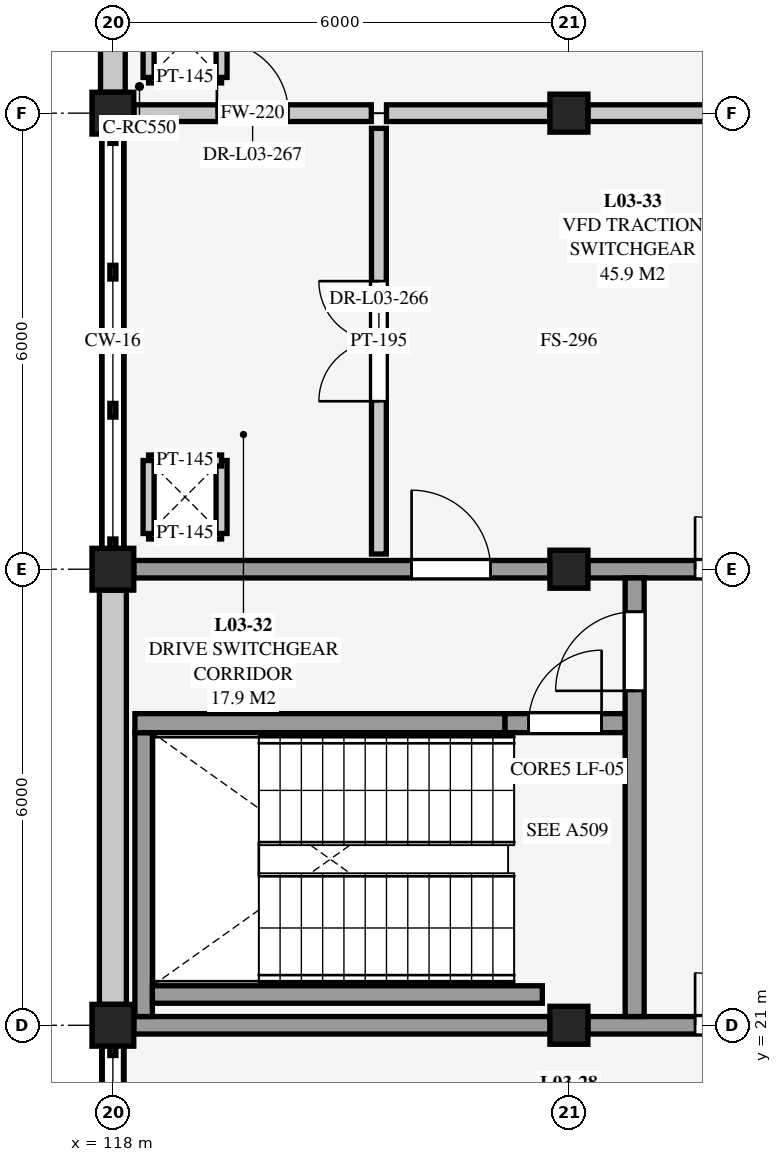
"""IFC4 building model, lengths in metres.
Left out: names, types, materials, properties, quantities, classifications, styles, units other than length and angle.
Written with IfcOpenShell. Run it as: python <this file> out.ifc"""

import sys

from ifc_helpers import new_model, si_unit, direction, frame, frame_2d, origin, origin_2d, place, context, subcontext, project, spatial, rectangle, extrude, element, fill, save


model = new_model("IFC4")
c1 = context("Model", 3, precision=1e-05, world=origin(), true_north=direction((0.0, 1.0)))
c2 = subcontext(c1, "Body", "Model", "MODEL_VIEW")
j1 = project(units=[si_unit("LENGTHUNIT", "METRE"), si_unit("PLANEANGLEUNIT", "RADIAN")], contexts=[c1])
p1 = place(None, origin())
s1 = spatial("IfcSite", under=j1, at=p1, CompositionType="ELEMENT")
p2 = place(p1, origin())
s2 = spatial("IfcBuilding", under=s1, at=p2, CompositionType="ELEMENT")
p3 = place(p2, frame((0.0, 0.0, 9.0)))
s3 = spatial("IfcBuildingStorey", under=s2, at=p3, CompositionType="ELEMENT", Elevation=9.0)
for number, where, z_axis, x_axis in (
    (1, (118.0, 21.0, 0.0), (0.0, 0.0, 1.0), (1.0, 0.0, 0.0)),
    (2, (118.0, 27.0, 0.0), (0.0, 0.0, 1.0), (1.0, 0.0, 0.0)),
    (3, (118.0, 33.0, 0.0), (0.0, 0.0, 1.0), (1.0, 0.0, 0.0)),
):
    element("IfcColumn", number, at=place(p3, frame(where, z_axis=z_axis, x_axis=x_axis)), inside=s3, PredefinedType="COLUMN", context=c2, shape_type="SweptSolid", body=[
        extrude(rectangle(XDim=0.55, YDim=0.55, at=origin_2d()), origin(), (0.0, 0.0, 1.0), 4.5),
    ])
for number, where, z_axis, x_axis in (
    (4, (124.0, 21.0, 0.0), (0.0, 0.0, 1.0), (1.0, 0.0, 0.0)),
    (5, (124.0, 27.0, 0.0), (0.0, 0.0, 1.0), (1.0, 0.0, 0.0)),
    (6, (124.0, 33.0, 0.0), (0.0, 0.0, 1.0), (1.0, 0.0, 0.0)),
):
    element("IfcColumn", number, at=place(p3, frame(where, z_axis=z_axis, x_axis=x_axis)), inside=s3, PredefinedType="COLUMN", context=c2, shape_type="SweptSolid", body=[
        extrude(rectangle(XDim=0.5, YDim=0.5, at=origin_2d()), origin(), (0.0, 0.0, 1.0), 4.5),
    ])
p4 = place(p3, frame((118.0, 15.25, 0.0), z_axis=(0.0, 0.0, 1.0), x_axis=(0.0, 1.0, 0.0)))
e7 = element("IfcWall", 7, at=p4, inside=s3, PredefinedType="SOLIDWALL", context=c2, shape_type="SweptSolid", body=[
    extrude(rectangle(XDim=5.475, YDim=0.295, at=frame_2d((2.738, 0.0))), origin(), (0.0, 0.0, 1.0), 0.46),
])
p5 = place(p3, frame((118.0, 21.275, 0.0), z_axis=(0.0, 0.0, 1.0), x_axis=(0.0, 1.0, 0.0)))
e8 = element("IfcWall", 8, at=p5, inside=s3, PredefinedType="SOLIDWALL", context=c2, shape_type="SweptSolid", body=[
    extrude(rectangle(XDim=5.45, YDim=0.355, at=frame_2d((2.725, 0.0))), origin(), (0.0, 0.0, 1.0), 3.778),
])
p6 = place(p3, frame((118.0, 27.275, 0.0), z_axis=(0.0, 0.0, 1.0), x_axis=(0.0, 1.0, 0.0)))
e9 = element("IfcWall", 9, at=p6, inside=s3, PredefinedType="SOLIDWALL", context=c2, shape_type="SweptSolid", body=[
    extrude(rectangle(XDim=5.45, YDim=0.295, at=frame_2d((2.725, 0.0))), origin(), (0.0, 0.0, 1.0), 0.52),
])
p7 = place(p3, frame((118.0, 33.275, 0.0), z_axis=(0.0, 0.0, 1.0), x_axis=(0.0, 1.0, 0.0)))
e10 = element("IfcWall", 10, at=p7, inside=s3, PredefinedType="SOLIDWALL", context=c2, shape_type="SweptSolid", body=[
    extrude(rectangle(XDim=5.45, YDim=0.325, at=frame_2d((2.725, 0.0))), origin(), (0.0, 0.0, 1.0), 3.778),
])
p8 = place(p7, frame((1.85, 0.0, 0.75)))
e11 = element("IfcOpeningElement", 11, at=p8, cuts=e10, PredefinedType="OPENING", context=c2, shape_type="SweptSolid", body=[
    extrude(rectangle(XDim=1.75, YDim=2.3, at=frame_2d((0.875, 1.15))), frame((0.0, 0.173, 0.0), z_axis=(0.0, -1.0, 0.0), x_axis=(1.0, 0.0, 0.0)), (0.0, 0.0, 1.0), 0.345),
])
for number, where, z_axis, x_axis in (
    (12, (118.47, 27.47, 0.0), (0.0, 0.0, 1.0), (1.0, 0.0, 0.0)),
    (13, (119.43, 27.47, 0.0), (0.0, 0.0, 1.0), (0.0, 1.0, 0.0)),
    (14, (119.43, 28.43, 0.0), (0.0, 0.0, 1.0), (-1.0, 0.0, 0.0)),
    (15, (118.47, 28.43, 0.0), (0.0, 0.0, 1.0), (0.0, -1.0, 0.0)),
):
    element("IfcWall", number, at=place(p3, frame(where, z_axis=z_axis, x_axis=x_axis)), inside=s3, PredefinedType="PARTITIONING", context=c2, shape_type="SweptSolid", body=[
        extrude(rectangle(XDim=0.96, YDim=0.145, at=frame_2d((0.48, 0.0))), origin(), (0.0, 0.0, 1.0), 4.185),
    ])
for number, where, z_axis, x_axis in (
    (16, (118.47, 33.47, 0.0), (0.0, 0.0, 1.0), (1.0, 0.0, 0.0)),
    (17, (119.43, 33.47, 0.0), (0.0, 0.0, 1.0), (0.0, 1.0, 0.0)),
    (18, (118.47, 34.43, 0.0), (0.0, 0.0, 1.0), (0.0, -1.0, 0.0)),
):
    element("IfcWall", number, at=place(p3, frame(where, z_axis=z_axis, x_axis=x_axis)), inside=s3, PredefinedType="PARTITIONING", context=c2, shape_type="SweptSolid", body=[
        extrude(rectangle(XDim=0.96, YDim=0.145, at=frame_2d((0.48, 0.0))), origin(), (0.0, 0.0, 1.0), 4.3),
    ])
p9 = place(p3, frame((118.275, 21.0, 0.0), z_axis=(0.0, 0.0, 1.0), x_axis=(1.0, 0.0, 0.0)))
e19 = element("IfcWall", 19, at=p9, inside=s3, PredefinedType="SHEAR", context=c2, shape_type="SweptSolid", body=[
    extrude(rectangle(XDim=5.475, YDim=0.23, at=frame_2d((2.738, 0.0))), origin(), (0.0, 0.0, 1.0), 4.185),
])
p10 = place(p3, frame((124.25, 21.0, 0.0), z_axis=(0.0, 0.0, 1.0), x_axis=(1.0, 0.0, 0.0)))
e20 = element("IfcWall", 20, at=p10, inside=s3, PredefinedType="SHEAR", context=c2, shape_type="SweptSolid", body=[
    extrude(rectangle(XDim=5.425, YDim=0.23, at=frame_2d((2.712, 0.0))), origin(), (0.0, 0.0, 1.0), 4.185),
])
p11 = place(p10, frame((1.41, 0.0, 0.0)))
e21 = element("IfcOpeningElement", 21, at=p11, cuts=e20, PredefinedType="OPENING", context=c2, shape_type="SweptSolid", body=[
    extrude(rectangle(XDim=1.38, YDim=2.16, at=frame_2d((0.69, 1.08))), frame((0.0, 0.125, 0.0), z_axis=(0.0, -1.0, 0.0), x_axis=(1.0, 0.0, 0.0)), (0.0, 0.0, 1.0), 0.25),
])
p12 = place(p3, frame((118.275, 27.0, 0.0), z_axis=(0.0, 0.0, 1.0), x_axis=(1.0, 0.0, 0.0)))
e22 = element("IfcWall", 22, at=p12, inside=s3, PredefinedType="SHEAR", context=c2, shape_type="SweptSolid", body=[
    extrude(rectangle(XDim=5.475, YDim=0.23, at=frame_2d((2.738, 0.0))), origin(), (0.0, 0.0, 1.0), 4.185),
])
p13 = place(p12, frame((3.655, 0.0, 0.0)))
e23 = element("IfcOpeningElement", 23, at=p13, cuts=e22, PredefinedType="OPENING", context=c2, shape_type="SweptSolid", body=[
    extrude(rectangle(XDim=1.04, YDim=2.14, at=frame_2d((0.52, 1.07))), frame((0.0, 0.125, 0.0), z_axis=(0.0, -1.0, 0.0), x_axis=(1.0, 0.0, 0.0)), (0.0, 0.0, 1.0), 0.25),
])
p14 = place(p3, frame((124.25, 27.0, 0.0), z_axis=(0.0, 0.0, 1.0), x_axis=(1.0, 0.0, 0.0)))
e24 = element("IfcWall", 24, at=p14, inside=s3, PredefinedType="SHEAR", context=c2, shape_type="SweptSolid", body=[
    extrude(rectangle(XDim=5.425, YDim=0.23, at=frame_2d((2.712, 0.0))), origin(), (0.0, 0.0, 1.0), 4.185),
])
p15 = place(p14, frame((1.41, 0.0, 0.0)))
e25 = element("IfcOpeningElement", 25, at=p15, cuts=e24, PredefinedType="OPENING", context=c2, shape_type="SweptSolid", body=[
    extrude(rectangle(XDim=1.38, YDim=2.16, at=frame_2d((0.69, 1.08))), frame((0.0, 0.125, 0.0), z_axis=(0.0, -1.0, 0.0), x_axis=(1.0, 0.0, 0.0)), (0.0, 0.0, 1.0), 0.25),
])
p16 = place(p3, frame((118.405, 21.115, 0.0), z_axis=(0.0, 0.0, 1.0), x_axis=(0.0, 1.0, 0.0)))
e26 = element("IfcWall", 26, at=p16, inside=s3, PredefinedType="SHEAR", context=c2, shape_type="SweptSolid", body=[
    extrude(rectangle(XDim=3.735, YDim=0.23, at=frame_2d((1.868, 0.0))), origin(), (0.0, 0.0, 1.0), 4.5),
])
p17 = place(p3, frame((118.52, 21.405, 0.0), z_axis=(0.0, 0.0, 1.0), x_axis=(1.0, 0.0, 0.0)))
e27 = element("IfcWall", 27, at=p17, inside=s3, PredefinedType="SHEAR", context=c2, shape_type="SweptSolid", body=[
    extrude(rectangle(XDim=5.13, YDim=0.23, at=frame_2d((2.565, 0.0))), origin(), (0.0, 0.0, 1.0), 4.5),
])
p18 = place(p3, frame((118.29, 24.975, 0.0), z_axis=(0.0, 0.0, 1.0), x_axis=(1.0, 0.0, 0.0)))
e28 = element("IfcWall", 28, at=p18, inside=s3, PredefinedType="SHEAR", context=c2, shape_type="SweptSolid", body=[
    extrude(rectangle(XDim=4.87, YDim=0.25, at=frame_2d((2.435, 0.0))), origin(), (0.0, 0.0, 1.0), 4.5),
])
p19 = place(p3, frame((123.16, 24.975, 0.0), z_axis=(0.0, 0.0, 1.0), x_axis=(1.0, 0.0, 0.0)))
e29 = element("IfcWall", 29, at=p19, inside=s3, PredefinedType="SHEAR", context=c2, shape_type="SweptSolid", body=[
    extrude(rectangle(XDim=1.58, YDim=0.25, at=frame_2d((0.79, 0.0))), origin(), (0.0, 0.0, 1.0), 4.185),
])
p20 = place(p19, frame((0.31, 0.0, 0.0)))
e30 = element("IfcOpeningElement", 30, at=p20, cuts=e29, PredefinedType="OPENING", context=c2, shape_type="SweptSolid", body=[
    extrude(rectangle(XDim=0.96, YDim=2.12, at=frame_2d((0.48, 1.06))), frame((0.0, 0.135, 0.0), z_axis=(0.0, -1.0, 0.0), x_axis=(1.0, 0.0, 0.0)), (0.0, 0.0, 1.0), 0.27),
])
p21 = place(p3, frame((124.865, 21.115, 0.0), z_axis=(0.0, 0.0, 1.0), x_axis=(0.0, 1.0, 0.0)))
e31 = element("IfcWall", 31, at=p21, inside=s3, PredefinedType="SHEAR", context=c2, shape_type="SweptSolid", body=[
    extrude(rectangle(XDim=5.77, YDim=0.25, at=frame_2d((2.885, 0.0))), origin(), (0.0, 0.0, 1.0), 4.185),
])
p22 = place(p21, frame((4.285, 0.0, 0.0)))
e32 = element("IfcOpeningElement", 32, at=p22, cuts=e31, PredefinedType="OPENING", context=c2, shape_type="SweptSolid", body=[
    extrude(rectangle(XDim=1.04, YDim=2.14, at=frame_2d((0.52, 1.07))), frame((0.0, 0.135, 0.0), z_axis=(0.0, -1.0, 0.0), x_axis=(1.0, 0.0, 0.0)), (0.0, 0.0, 1.0), 0.27),
])
p23 = place(p3, frame((121.5, 27.2, 0.0), z_axis=(0.0, 0.0, 1.0), x_axis=(0.0, 1.0, 0.0)))
e33 = element("IfcWall", 33, at=p23, inside=s3, PredefinedType="PARTITIONING", context=c2, shape_type="SweptSolid", body=[
    extrude(rectangle(XDim=5.6, YDim=0.195, at=frame_2d((2.8, 0.0))), origin(), (0.0, 0.0, 1.0), 4.185),
])
p24 = place(p23, frame((2.01, 0.0, 0.0)))
e34 = element("IfcOpeningElement", 34, at=p24, cuts=e33, PredefinedType="OPENING", context=c2, shape_type="SweptSolid", body=[
    extrude(rectangle(XDim=1.58, YDim=2.2, at=frame_2d((0.79, 1.1))), frame((0.0, 0.108, 0.0), z_axis=(0.0, -1.0, 0.0), x_axis=(1.0, 0.0, 0.0)), (0.0, 0.0, 1.0), 0.215),
])
p25 = place(p3, frame((118.277, 33.0, 0.0), z_axis=(0.0, 0.0, 1.0), x_axis=(1.0, 0.0, 0.0)))
e35 = element("IfcWall", 35, at=p25, inside=s3, PredefinedType="SOLIDWALL", context=c2, shape_type="SweptSolid", body=[
    extrude(rectangle(XDim=3.123, YDim=0.22, at=frame_2d((1.562, 0.0))), origin(), (0.0, 0.0, 1.0), 3.568),
])
p26 = place(p25, frame((1.092, 0.0, 0.0)))
e36 = element("IfcOpeningElement", 36, at=p26, cuts=e35, PredefinedType="OPENING", context=c2, shape_type="SweptSolid", body=[
    extrude(rectangle(XDim=0.94, YDim=2.1, at=frame_2d((0.47, 1.05))), frame((0.0, 0.12, 0.0), z_axis=(0.0, -1.0, 0.0), x_axis=(1.0, 0.0, 0.0)), (0.0, 0.0, 1.0), 0.24),
])
p27 = place(p3, frame((124.252, 33.0, 0.0), z_axis=(0.0, 0.0, 1.0), x_axis=(1.0, 0.0, 0.0)))
e37 = element("IfcWall", 37, at=p27, inside=s3, PredefinedType="SOLIDWALL", context=c2, shape_type="SweptSolid", body=[
    extrude(rectangle(XDim=5.421, YDim=0.22, at=frame_2d((2.71, 0.0))), origin(), (0.0, 0.0, 1.0), 3.568),
])
p28 = place(p27, frame((2.24, 0.0, 0.0)))
e38 = element("IfcOpeningElement", 38, at=p28, cuts=e37, PredefinedType="OPENING", context=c2, shape_type="SweptSolid", body=[
    extrude(rectangle(XDim=0.94, YDim=2.1, at=frame_2d((0.47, 1.05))), frame((0.0, 0.12, 0.0), z_axis=(0.0, -1.0, 0.0), x_axis=(1.0, 0.0, 0.0)), (0.0, 0.0, 1.0), 0.24),
])
p29 = place(p3, frame((121.6, 33.0, 0.0), z_axis=(0.0, 0.0, 1.0), x_axis=(1.0, 0.0, 0.0)))
e39 = element("IfcWall", 39, at=p29, inside=s3, PredefinedType="SOLIDWALL", context=c2, shape_type="SweptSolid", body=[
    extrude(rectangle(XDim=2.148, YDim=0.22, at=frame_2d((1.074, 0.0))), origin(), (0.0, 0.0, 1.0), 3.568),
])
p30 = place(p11, origin())
e40 = element("IfcDoor", 40, at=p30, inside=s3, OperationType="DOUBLE_DOOR_SINGLE_SWING", PredefinedType="DOOR", context=c2, shape_type="SweptSolid", body=[
    extrude(rectangle(XDim=1.38, YDim=2.16, at=frame_2d((0.69, 1.08))), frame((0.0, 0.025, 0.0), z_axis=(0.0, -1.0, 0.0), x_axis=(1.0, 0.0, 0.0)), (0.0, 0.0, 1.0), 0.05),
])
fill(e21, e40)
p31 = place(p13, origin())
e41 = element("IfcDoor", 41, at=p31, inside=s3, OperationType="SINGLE_SWING_LEFT", PredefinedType="DOOR", context=c2, shape_type="SweptSolid", body=[
    extrude(rectangle(XDim=1.04, YDim=2.14, at=frame_2d((0.52, 1.07))), frame((0.0, 0.025, 0.0), z_axis=(0.0, -1.0, 0.0), x_axis=(1.0, 0.0, 0.0)), (0.0, 0.0, 1.0), 0.05),
])
fill(e23, e41)
p32 = place(p15, origin())
e42 = element("IfcDoor", 42, at=p32, inside=s3, OperationType="DOUBLE_DOOR_SINGLE_SWING", PredefinedType="DOOR", context=c2, shape_type="SweptSolid", body=[
    extrude(rectangle(XDim=1.38, YDim=2.16, at=frame_2d((0.69, 1.08))), frame((0.0, 0.025, 0.0), z_axis=(0.0, -1.0, 0.0), x_axis=(1.0, 0.0, 0.0)), (0.0, 0.0, 1.0), 0.05),
])
fill(e25, e42)
p33 = place(p20, origin())
e43 = element("IfcDoor", 43, at=p33, inside=s3, OperationType="SINGLE_SWING_RIGHT", PredefinedType="DOOR", context=c2, shape_type="SweptSolid", body=[
    extrude(rectangle(XDim=0.96, YDim=2.12, at=frame_2d((0.48, 1.06))), frame((0.0, 0.025, 0.0), z_axis=(0.0, -1.0, 0.0), x_axis=(1.0, 0.0, 0.0)), (0.0, 0.0, 1.0), 0.05),
])
fill(e30, e43)
p34 = place(p22, origin())
e44 = element("IfcDoor", 44, at=p34, inside=s3, OperationType="SINGLE_SWING_LEFT", PredefinedType="DOOR", context=c2, shape_type="SweptSolid", body=[
    extrude(rectangle(XDim=1.04, YDim=2.14, at=frame_2d((0.52, 1.07))), frame((0.0, 0.025, 0.0), z_axis=(0.0, -1.0, 0.0), x_axis=(1.0, 0.0, 0.0)), (0.0, 0.0, 1.0), 0.05),
])
fill(e32, e44)
p35 = place(p24, origin())
e45 = element("IfcDoor", 45, at=p35, inside=s3, OperationType="DOUBLE_DOOR_SINGLE_SWING", PredefinedType="DOOR", context=c2, shape_type="SweptSolid", body=[
    extrude(rectangle(XDim=1.58, YDim=2.2, at=frame_2d((0.79, 1.1))), frame((0.0, 0.025, 0.0), z_axis=(0.0, -1.0, 0.0), x_axis=(1.0, 0.0, 0.0)), (0.0, 0.0, 1.0), 0.05),
])
fill(e34, e45)
p36 = place(p26, origin())
e46 = element("IfcDoor", 46, at=p36, inside=s3, OperationType="SINGLE_SWING_LEFT", PredefinedType="DOOR", context=c2, shape_type="SweptSolid", body=[
    extrude(rectangle(XDim=0.94, YDim=2.1, at=frame_2d((0.47, 1.05))), frame((0.0, 0.025, 0.0), z_axis=(0.0, -1.0, 0.0), x_axis=(1.0, 0.0, 0.0)), (0.0, 0.0, 1.0), 0.05),
])
fill(e36, e46)
save(model, sys.argv[1])
